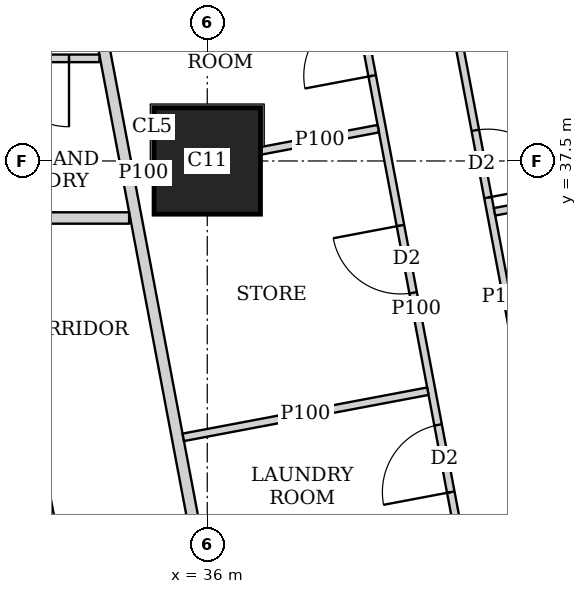
"""IFC4 building model, lengths in metres.
Left out: names, types, materials, properties, quantities, classifications, styles, units other than length and angle.
Written with IfcOpenShell. Run it as: python <this file> out.ifc"""

import sys

from ifc_helpers import new_model, si_unit, direction, frame, frame_2d, origin, origin_2d, place, context, subcontext, project, spatial, rectangle, extrude, element, fill, save


model = new_model("IFC4")
c1 = context("Model", 3, precision=1e-05, world=origin(), true_north=direction((0.0, 1.0)))
c2 = subcontext(c1, "Body", "Model", "MODEL_VIEW")
j1 = project(units=[si_unit("LENGTHUNIT", "METRE"), si_unit("PLANEANGLEUNIT", "RADIAN")], contexts=[c1])
p1 = place(None, origin())
s1 = spatial("IfcSite", under=j1, at=p1, CompositionType="ELEMENT")
p2 = place(p1, origin())
s2 = spatial("IfcBuilding", under=s1, at=p2, CompositionType="ELEMENT")
p3 = place(p2, frame((0.0, 0.0, 270.35)))
s3 = spatial("IfcBuildingStorey", under=s2, at=p3, CompositionType="ELEMENT", Elevation=270.35)
p4 = place(p3, frame((36.0, 37.5, 0.0), z_axis=(0.0, 0.0, 1.0), x_axis=(1.0, 0.0, 0.0)))
e1 = element("IfcColumn", 1, at=p4, inside=s3, PredefinedType="COLUMN", context=c2, shape_type="SweptSolid", body=[
    extrude(rectangle(XDim=1.4, YDim=1.4, at=origin_2d()), origin(), (0.0, 0.0, 1.0), 3.75),
])
p5 = place(p3, frame((29.501, 36.75, 0.0), z_axis=(0.0, 0.0, 1.0), x_axis=(1.0, 0.0, 0.0)))
e2 = element("IfcWall", 2, at=p5, inside=s3, PredefinedType="SOLIDWALL", context=c2, shape_type="SweptSolid", body=[
    extrude(rectangle(XDim=5.471, YDim=0.15, at=frame_2d((2.735, 0.0))), origin(), (0.0, 0.0, 1.0), 3.5),
])
p6 = place(p3, frame((34.036, 42.186, 0.0), z_axis=(0.0, 0.0, 1.0), x_axis=(0.185593518645, -0.9826266055, 0.0)))
e3 = element("IfcWall", 3, at=p6, inside=s3, PredefinedType="SOLIDWALL", context=c2, shape_type="SweptSolid", body=[
    extrude(rectangle(XDim=35.961, YDim=0.15, at=frame_2d((17.98, 0.0))), origin(), (0.0, 0.0, 1.0), 2.5),
])
p7 = place(p6, frame((15.529, 0.0, 0.0)))
e4 = element("IfcOpeningElement", 4, at=p7, cuts=e3, PredefinedType="OPENING", context=c2, shape_type="SweptSolid", body=[
    extrude(rectangle(XDim=1.0, YDim=2.1, at=frame_2d((0.5, 1.05))), frame((0.0, 0.085, 0.0), z_axis=(0.0, -1.0, 0.0), x_axis=(1.0, 0.0, 0.0)), (0.0, 0.0, 1.0), 0.17),
])
p8 = place(p6, frame((19.345, 0.0, 0.0)))
e5 = element("IfcOpeningElement", 5, at=p8, cuts=e3, PredefinedType="OPENING", context=c2, shape_type="SweptSolid", body=[
    extrude(rectangle(XDim=1.0, YDim=2.1, at=frame_2d((0.5, 1.05))), frame((0.0, 0.085, 0.0), z_axis=(0.0, -1.0, 0.0), x_axis=(1.0, 0.0, 0.0)), (0.0, 0.0, 1.0), 0.17),
])
p9 = place(p6, frame((30.594, 0.0, 0.0)))
e6 = element("IfcOpeningElement", 6, at=p9, cuts=e3, PredefinedType="OPENING", context=c2, shape_type="SweptSolid", body=[
    extrude(rectangle(XDim=1.0, YDim=2.1, at=frame_2d((0.5, 1.05))), frame((0.0, 0.085, 0.0), z_axis=(0.0, -1.0, 0.0), x_axis=(1.0, 0.0, 0.0)), (0.0, 0.0, 1.0), 0.17),
])
p10 = place(p3, frame((38.744, 42.045, 0.0), z_axis=(0.0, 0.0, 1.0), x_axis=(0.185614085367, -0.982622720739, 0.0)))
e7 = element("IfcWall", 7, at=p10, inside=s3, PredefinedType="PARTITIONING", context=c2, shape_type="SweptSolid", body=[
    extrude(rectangle(XDim=12.898, YDim=0.1, at=frame_2d((6.449, 0.0))), origin(), (0.0, 0.0, 1.0), 2.5),
])
p11 = place(p10, frame((11.848, 0.0, 0.0)))
e8 = element("IfcOpeningElement", 8, at=p11, cuts=e7, PredefinedType="OPENING", context=c2, shape_type="SweptSolid", body=[
    extrude(rectangle(XDim=0.9, YDim=2.1, at=frame_2d((0.45, 1.05))), frame((0.0, 0.06, 0.0), z_axis=(0.0, -1.0, 0.0), x_axis=(1.0, 0.0, 0.0)), (0.0, 0.0, 1.0), 0.12),
])
p12 = place(p10, frame((8.191, 0.0, 0.0)))
e9 = element("IfcOpeningElement", 9, at=p12, cuts=e7, PredefinedType="OPENING", context=c2, shape_type="SweptSolid", body=[
    extrude(rectangle(XDim=0.9, YDim=2.1, at=frame_2d((0.45, 1.05))), frame((0.0, 0.06, 0.0), z_axis=(0.0, -1.0, 0.0), x_axis=(1.0, 0.0, 0.0)), (0.0, 0.0, 1.0), 0.12),
])
p13 = place(p10, frame((4.215, 0.0, 0.0)))
e10 = element("IfcOpeningElement", 10, at=p13, cuts=e7, PredefinedType="OPENING", context=c2, shape_type="SweptSolid", body=[
    extrude(rectangle(XDim=0.9, YDim=2.1, at=frame_2d((0.45, 1.05))), frame((0.0, 0.06, 0.0), z_axis=(0.0, -1.0, 0.0), x_axis=(1.0, 0.0, 0.0)), (0.0, 0.0, 1.0), 0.12),
])
p14 = place(p3, frame((37.511, 42.109, 0.0), z_axis=(0.0, 0.0, 1.0), x_axis=(0.185550464988, -0.982634736279, 0.0)))
e11 = element("IfcWall", 11, at=p14, inside=s3, PredefinedType="PARTITIONING", context=c2, shape_type="SweptSolid", body=[
    extrude(rectangle(XDim=13.35, YDim=0.1, at=frame_2d((6.675, 0.0))), origin(), (0.0, 0.0, 1.0), 2.5),
])
p15 = place(p14, frame((11.845, 0.0, 0.0)))
e12 = element("IfcOpeningElement", 12, at=p15, cuts=e11, PredefinedType="OPENING", context=c2, shape_type="SweptSolid", body=[
    extrude(rectangle(XDim=0.9, YDim=2.1, at=frame_2d((0.45, 1.05))), frame((0.0, 0.06, 0.0), z_axis=(0.0, -1.0, 0.0), x_axis=(1.0, 0.0, 0.0)), (0.0, 0.0, 1.0), 0.12),
])
p16 = place(p14, frame((8.224, 0.0, 0.0)))
e13 = element("IfcOpeningElement", 13, at=p16, cuts=e11, PredefinedType="OPENING", context=c2, shape_type="SweptSolid", body=[
    extrude(rectangle(XDim=0.9, YDim=2.1, at=frame_2d((0.45, 1.05))), frame((0.0, 0.06, 0.0), z_axis=(0.0, -1.0, 0.0), x_axis=(1.0, 0.0, 0.0)), (0.0, 0.0, 1.0), 0.12),
])
p17 = place(p14, frame((2.65, 0.0, 0.0)))
e14 = element("IfcOpeningElement", 14, at=p17, cuts=e11, PredefinedType="OPENING", context=c2, shape_type="SweptSolid", body=[
    extrude(rectangle(XDim=0.9, YDim=2.1, at=frame_2d((0.45, 1.05))), frame((0.0, 0.06, 0.0), z_axis=(0.0, -1.0, 0.0), x_axis=(1.0, 0.0, 0.0)), (0.0, 0.0, 1.0), 0.12),
])
p18 = place(p14, frame((9.936, 0.0, 0.0)))
e15 = element("IfcOpeningElement", 15, at=p18, cuts=e11, PredefinedType="OPENING", context=c2, shape_type="SweptSolid", body=[
    extrude(rectangle(XDim=0.9, YDim=2.1, at=frame_2d((0.45, 1.05))), frame((0.0, 0.06, 0.0), z_axis=(0.0, -1.0, 0.0), x_axis=(1.0, 0.0, 0.0)), (0.0, 0.0, 1.0), 0.12),
])
p19 = place(p14, frame((5.555, 0.0, 0.0)))
e16 = element("IfcOpeningElement", 16, at=p19, cuts=e11, PredefinedType="OPENING", context=c2, shape_type="SweptSolid", body=[
    extrude(rectangle(XDim=0.9, YDim=2.1, at=frame_2d((0.45, 1.05))), frame((0.0, 0.06, 0.0), z_axis=(0.0, -1.0, 0.0), x_axis=(1.0, 0.0, 0.0)), (0.0, 0.0, 1.0), 0.12),
])
p20 = place(p3, frame((41.054, 37.072, 0.0), z_axis=(0.0, 0.0, 1.0), x_axis=(-0.982576752117, -0.185857273733, 0.0)))
e17 = element("IfcWall", 17, at=p20, inside=s3, PredefinedType="PARTITIONING", context=c2, shape_type="SweptSolid", body=[
    extrude(rectangle(XDim=1.297, YDim=0.1, at=frame_2d((0.648, 0.0))), origin(), (0.0, 0.0, 1.0), 3.5),
])
p21 = place(p3, frame((38.25, 37.925, 0.0), z_axis=(0.0, 0.0, 1.0), x_axis=(-0.982610209589, -0.185680305934, 0.0)))
e18 = element("IfcWall", 18, at=p21, inside=s3, PredefinedType="PARTITIONING", context=c2, shape_type="SweptSolid", body=[
    extrude(rectangle(XDim=1.567, YDim=0.1, at=frame_2d((0.784, 0.0))), origin(), (0.0, 0.0, 1.0), 3.5),
])
p22 = place(p3, frame((35.29, 37.366, 0.0), z_axis=(0.0, 0.0, 1.0), x_axis=(-0.982395465615, -0.18681313963, 0.0)))
e19 = element("IfcWall", 19, at=p22, inside=s3, PredefinedType="PARTITIONING", context=c2, shape_type="SweptSolid", body=[
    extrude(rectangle(XDim=0.263, YDim=0.1, at=frame_2d((0.131, 0.0))), origin(), (0.0, 0.0, 1.0), 3.5),
])
p23 = place(p3, frame((38.902, 34.471, 0.0), z_axis=(0.0, 0.0, 1.0), x_axis=(-0.982674977865, -0.185337227447, 0.0)))
e20 = element("IfcWall", 20, at=p23, inside=s3, PredefinedType="PARTITIONING", context=c2, shape_type="SweptSolid", body=[
    extrude(rectangle(XDim=3.275, YDim=0.1, at=frame_2d((1.637, 0.0))), origin(), (0.0, 0.0, 1.0), 3.5),
])
p24 = place(p3, frame((21.6, 38.85, 0.0), z_axis=(0.0, 0.0, 1.0), x_axis=(1.0, 0.0, 0.0)))
e21 = element("IfcWall", 21, at=p24, inside=s3, PredefinedType="PARTITIONING", context=c2, shape_type="SweptSolid", body=[
    extrude(rectangle(XDim=12.981, YDim=0.1, at=frame_2d((6.49, 0.0))), origin(), (0.0, 0.0, 1.0), 3.5),
])
p25 = place(p24, frame((1.35, 0.0, 0.0)))
e22 = element("IfcOpeningElement", 22, at=p25, cuts=e21, PredefinedType="OPENING", context=c2, shape_type="SweptSolid", body=[
    extrude(rectangle(XDim=0.9, YDim=2.1, at=frame_2d((0.45, 1.05))), frame((0.0, 0.06, 0.0), z_axis=(0.0, -1.0, 0.0), x_axis=(1.0, 0.0, 0.0)), (0.0, 0.0, 1.0), 0.12),
])
p26 = place(p24, frame((5.55, 0.0, 0.0)))
e23 = element("IfcOpeningElement", 23, at=p26, cuts=e21, PredefinedType="OPENING", context=c2, shape_type="SweptSolid", body=[
    extrude(rectangle(XDim=0.9, YDim=2.1, at=frame_2d((0.45, 1.05))), frame((0.0, 0.06, 0.0), z_axis=(0.0, -1.0, 0.0), x_axis=(1.0, 0.0, 0.0)), (0.0, 0.0, 1.0), 0.12),
])
p27 = place(p24, frame((8.55, 0.0, 0.0)))
e24 = element("IfcOpeningElement", 24, at=p27, cuts=e21, PredefinedType="OPENING", context=c2, shape_type="SweptSolid", body=[
    extrude(rectangle(XDim=0.9, YDim=2.1, at=frame_2d((0.45, 1.05))), frame((0.0, 0.06, 0.0), z_axis=(0.0, -1.0, 0.0), x_axis=(1.0, 0.0, 0.0)), (0.0, 0.0, 1.0), 0.12),
])
p28 = place(p24, frame((11.681, 0.0, 0.0)))
e25 = element("IfcOpeningElement", 25, at=p28, cuts=e21, PredefinedType="OPENING", context=c2, shape_type="SweptSolid", body=[
    extrude(rectangle(XDim=0.9, YDim=2.1, at=frame_2d((0.45, 1.05))), frame((0.0, 0.06, 0.0), z_axis=(0.0, -1.0, 0.0), x_axis=(1.0, 0.0, 0.0)), (0.0, 0.0, 1.0), 0.12),
])
p29 = place(p3, frame((38.202, 10.163, 0.0), z_axis=(0.0, 0.0, 1.0), x_axis=(-0.185610321132, 0.982623431783, 0.0)))
e26 = element("IfcWall", 26, at=p29, inside=s3, PredefinedType="PARTITIONING", context=c2, shape_type="SweptSolid", body=[
    extrude(rectangle(XDim=25.111, YDim=0.125, at=frame_2d((12.556, 0.0))), origin(), (0.0, 0.0, 1.0), 2.5),
])
p30 = place(p29, frame((0.708, 0.0, 0.0)))
e27 = element("IfcOpeningElement", 27, at=p30, cuts=e26, PredefinedType="OPENING", context=c2, shape_type="SweptSolid", body=[
    extrude(rectangle(XDim=1.0, YDim=2.1, at=frame_2d((0.5, 1.05))), frame((0.0, 0.073, 0.0), z_axis=(0.0, -1.0, 0.0), x_axis=(1.0, 0.0, 0.0)), (0.0, 0.0, 1.0), 0.145),
])
p31 = place(p29, frame((5.9, 0.0, 0.0)))
e28 = element("IfcOpeningElement", 28, at=p31, cuts=e26, PredefinedType="OPENING", context=c2, shape_type="SweptSolid", body=[
    extrude(rectangle(XDim=1.0, YDim=2.1, at=frame_2d((0.5, 1.05))), frame((0.0, 0.073, 0.0), z_axis=(0.0, -1.0, 0.0), x_axis=(1.0, 0.0, 0.0)), (0.0, 0.0, 1.0), 0.145),
])
p32 = place(p29, frame((13.378, 0.0, 0.0)))
e29 = element("IfcOpeningElement", 29, at=p32, cuts=e26, PredefinedType="OPENING", context=c2, shape_type="SweptSolid", body=[
    extrude(rectangle(XDim=1.0, YDim=2.1, at=frame_2d((0.5, 1.05))), frame((0.0, 0.073, 0.0), z_axis=(0.0, -1.0, 0.0), x_axis=(1.0, 0.0, 0.0)), (0.0, 0.0, 1.0), 0.145),
])
p33 = place(p29, frame((17.194, 0.0, 0.0)))
e30 = element("IfcOpeningElement", 30, at=p33, cuts=e26, PredefinedType="OPENING", context=c2, shape_type="SweptSolid", body=[
    extrude(rectangle(XDim=1.0, YDim=2.1, at=frame_2d((0.5, 1.05))), frame((0.0, 0.073, 0.0), z_axis=(0.0, -1.0, 0.0), x_axis=(1.0, 0.0, 0.0)), (0.0, 0.0, 1.0), 0.145),
])
p34 = place(p29, frame((21.15, 0.0, 0.0)))
e31 = element("IfcOpeningElement", 31, at=p34, cuts=e26, PredefinedType="OPENING", context=c2, shape_type="SweptSolid", body=[
    extrude(rectangle(XDim=1.0, YDim=2.1, at=frame_2d((0.5, 1.05))), frame((0.0, 0.073, 0.0), z_axis=(0.0, -1.0, 0.0), x_axis=(1.0, 0.0, 0.0)), (0.0, 0.0, 1.0), 0.145),
])
p35 = place(p13, origin())
e32 = element("IfcDoor", 32, at=p35, inside=s3, OperationType="SINGLE_SWING_RIGHT", PredefinedType="DOOR", context=c2, shape_type="SweptSolid", body=[
    extrude(rectangle(XDim=0.9, YDim=2.1, at=frame_2d((0.45, 1.05))), frame((0.0, 0.025, 0.0), z_axis=(0.0, -1.0, 0.0), x_axis=(1.0, 0.0, 0.0)), (0.0, 0.0, 1.0), 0.05),
])
fill(e10, e32)
p36 = place(p16, origin())
e33 = element("IfcDoor", 33, at=p36, inside=s3, OperationType="SINGLE_SWING_LEFT", PredefinedType="DOOR", context=c2, shape_type="SweptSolid", body=[
    extrude(rectangle(XDim=0.9, YDim=2.1, at=frame_2d((0.45, 1.05))), frame((0.0, 0.025, 0.0), z_axis=(0.0, -1.0, 0.0), x_axis=(1.0, 0.0, 0.0)), (0.0, 0.0, 1.0), 0.05),
])
fill(e13, e33)
p37 = place(p17, origin())
e34 = element("IfcDoor", 34, at=p37, inside=s3, OperationType="SINGLE_SWING_LEFT", PredefinedType="DOOR", context=c2, shape_type="SweptSolid", body=[
    extrude(rectangle(XDim=0.9, YDim=2.1, at=frame_2d((0.45, 1.05))), frame((0.0, 0.025, 0.0), z_axis=(0.0, -1.0, 0.0), x_axis=(1.0, 0.0, 0.0)), (0.0, 0.0, 1.0), 0.05),
])
fill(e14, e34)
p38 = place(p19, origin())
e35 = element("IfcDoor", 35, at=p38, inside=s3, OperationType="SINGLE_SWING_RIGHT", PredefinedType="DOOR", context=c2, shape_type="SweptSolid", body=[
    extrude(rectangle(XDim=0.9, YDim=2.1, at=frame_2d((0.45, 1.05))), frame((0.0, 0.025, 0.0), z_axis=(0.0, -1.0, 0.0), x_axis=(1.0, 0.0, 0.0)), (0.0, 0.0, 1.0), 0.05),
])
fill(e16, e35)
p39 = place(p28, origin())
e36 = element("IfcDoor", 36, at=p39, inside=s3, OperationType="SINGLE_SWING_LEFT", PredefinedType="DOOR", context=c2, shape_type="SweptSolid", body=[
    extrude(rectangle(XDim=0.9, YDim=2.1, at=frame_2d((0.45, 1.05))), frame((0.0, 0.025, 0.0), z_axis=(0.0, -1.0, 0.0), x_axis=(1.0, 0.0, 0.0)), (0.0, 0.0, 1.0), 0.05),
])
fill(e25, e36)
save(model, sys.argv[1])
